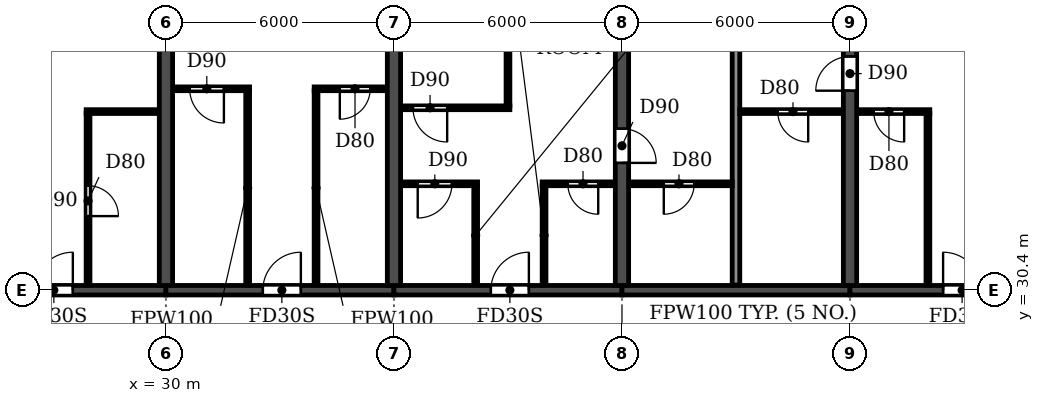
"""IFC4 building model, lengths in metres.
Left out: names, types, materials, properties, quantities, classifications, styles, units other than length and angle.
Written with IfcOpenShell. Run it as: python <this file> out.ifc"""

import sys

from ifc_helpers import new_model, si_unit, direction, frame, frame_2d, origin, place, context, subcontext, project, spatial, rectangle, extrude, element, fill, save


model = new_model("IFC4")
c1 = context("Model", 3, precision=1e-05, world=origin(), true_north=direction((0.0, 1.0)))
c2 = subcontext(c1, "Body", "Model", "MODEL_VIEW")
j1 = project(units=[si_unit("LENGTHUNIT", "METRE"), si_unit("PLANEANGLEUNIT", "RADIAN")], contexts=[c1])
p1 = place(None, origin())
s1 = spatial("IfcSite", under=j1, at=p1, CompositionType="ELEMENT")
p2 = place(p1, origin())
s2 = spatial("IfcBuilding", under=s1, at=p2, CompositionType="ELEMENT")
p3 = place(p2, frame((0.0, 0.0, 112.5)))
s3 = spatial("IfcBuildingStorey", under=s2, at=p3, CompositionType="ELEMENT", Elevation=112.5)
for number, where, z_axis, x_axis in (
    (1, (30.0, 30.525, 0.0), (0.0, 0.0, 1.0), (0.0, 1.0, 0.0)),
    (2, (36.0, 30.525, 0.0), (0.0, 0.0, 1.0), (0.0, 1.0, 0.0)),
):
    element("IfcWall", number, at=place(p3, frame(where, z_axis=z_axis, x_axis=x_axis)), inside=s3, PredefinedType="SHEAR", context=c2, shape_type="SweptSolid", body=[
        extrude(rectangle(XDim=12.875, YDim=0.35, at=frame_2d((6.438, 0.0))), origin(), (0.0, 0.0, 1.0), 2.95),
    ])
p4 = place(p3, frame((42.0, 30.525, 0.0), z_axis=(0.0, 0.0, 1.0), x_axis=(0.0, 1.0, 0.0)))
e3 = element("IfcWall", 3, at=p4, inside=s3, PredefinedType="SHEAR", context=c2, shape_type="SweptSolid", body=[
    extrude(rectangle(XDim=12.875, YDim=0.35, at=frame_2d((6.438, 0.0))), origin(), (0.0, 0.0, 1.0), 2.95),
])
p5 = place(p4, frame((3.225, 0.0, 0.0)))
e4 = element("IfcOpeningElement", 4, at=p5, cuts=e3, PredefinedType="OPENING", context=c2, shape_type="SweptSolid", body=[
    extrude(rectangle(XDim=0.9, YDim=2.1, at=frame_2d((0.45, 1.05))), frame((0.0, 0.185, 0.0), z_axis=(0.0, -1.0, 0.0), x_axis=(1.0, 0.0, 0.0)), (0.0, 0.0, 1.0), 0.37),
])
p6 = place(p3, frame((48.0, 30.525, 0.0), z_axis=(0.0, 0.0, 1.0), x_axis=(0.0, 1.0, 0.0)))
e5 = element("IfcWall", 5, at=p6, inside=s3, PredefinedType="SHEAR", context=c2, shape_type="SweptSolid", body=[
    extrude(rectangle(XDim=12.875, YDim=0.35, at=frame_2d((6.438, 0.0))), origin(), (0.0, 0.0, 1.0), 2.95),
])
p7 = place(p6, frame((5.125, 0.0, 0.0)))
e6 = element("IfcOpeningElement", 6, at=p7, cuts=e5, PredefinedType="OPENING", context=c2, shape_type="SweptSolid", body=[
    extrude(rectangle(XDim=0.9, YDim=2.1, at=frame_2d((0.45, 1.05))), frame((0.0, 0.185, 0.0), z_axis=(0.0, -1.0, 0.0), x_axis=(1.0, 0.0, 0.0)), (0.0, 0.0, 1.0), 0.37),
])
p8 = place(p3, frame((24.0, 30.4, 0.0), z_axis=(0.0, 0.0, 1.0), x_axis=(1.0, 0.0, 0.0)))
e7 = element("IfcWall", 7, at=p8, inside=s3, PredefinedType="SHEAR", context=c2, shape_type="SweptSolid", body=[
    extrude(rectangle(XDim=6.0, YDim=0.25, at=frame_2d((3.0, 0.0))), origin(), (0.0, 0.0, 1.0), 2.35),
])
p9 = place(p8, frame((2.55, 0.0, 0.0)))
e8 = element("IfcOpeningElement", 8, at=p9, cuts=e7, PredefinedType="OPENING", context=c2, shape_type="SweptSolid", body=[
    extrude(rectangle(XDim=1.0, YDim=2.1, at=frame_2d((0.5, 1.05))), frame((0.0, 0.135, 0.0), z_axis=(0.0, -1.0, 0.0), x_axis=(1.0, 0.0, 0.0)), (0.0, 0.0, 1.0), 0.27),
])
p10 = place(p3, frame((30.0, 30.4, 0.0), z_axis=(0.0, 0.0, 1.0), x_axis=(1.0, 0.0, 0.0)))
e9 = element("IfcWall", 9, at=p10, inside=s3, PredefinedType="SHEAR", context=c2, shape_type="SweptSolid", body=[
    extrude(rectangle(XDim=6.0, YDim=0.25, at=frame_2d((3.0, 0.0))), origin(), (0.0, 0.0, 1.0), 2.35),
])
p11 = place(p10, frame((2.55, 0.0, 0.0)))
e10 = element("IfcOpeningElement", 10, at=p11, cuts=e9, PredefinedType="OPENING", context=c2, shape_type="SweptSolid", body=[
    extrude(rectangle(XDim=1.0, YDim=2.1, at=frame_2d((0.5, 1.05))), frame((0.0, 0.135, 0.0), z_axis=(0.0, -1.0, 0.0), x_axis=(1.0, 0.0, 0.0)), (0.0, 0.0, 1.0), 0.27),
])
p12 = place(p3, frame((36.0, 30.4, 0.0), z_axis=(0.0, 0.0, 1.0), x_axis=(1.0, 0.0, 0.0)))
e11 = element("IfcWall", 11, at=p12, inside=s3, PredefinedType="SHEAR", context=c2, shape_type="SweptSolid", body=[
    extrude(rectangle(XDim=6.0, YDim=0.25, at=frame_2d((3.0, 0.0))), origin(), (0.0, 0.0, 1.0), 2.35),
])
p13 = place(p12, frame((2.55, 0.0, 0.0)))
e12 = element("IfcOpeningElement", 12, at=p13, cuts=e11, PredefinedType="OPENING", context=c2, shape_type="SweptSolid", body=[
    extrude(rectangle(XDim=1.0, YDim=2.1, at=frame_2d((0.5, 1.05))), frame((0.0, 0.135, 0.0), z_axis=(0.0, -1.0, 0.0), x_axis=(1.0, 0.0, 0.0)), (0.0, 0.0, 1.0), 0.27),
])
p14 = place(p3, frame((42.0, 30.4, 0.0), z_axis=(0.0, 0.0, 1.0), x_axis=(1.0, 0.0, 0.0)))
e13 = element("IfcWall", 13, at=p14, inside=s3, PredefinedType="SHEAR", context=c2, shape_type="SweptSolid", body=[
    extrude(rectangle(XDim=6.0, YDim=0.25, at=frame_2d((3.0, 0.0))), origin(), (0.0, 0.0, 1.0), 2.35),
])
p15 = place(p3, frame((48.0, 30.4, 0.0), z_axis=(0.0, 0.0, 1.0), x_axis=(1.0, 0.0, 0.0)))
e14 = element("IfcWall", 14, at=p15, inside=s3, PredefinedType="SHEAR", context=c2, shape_type="SweptSolid", body=[
    extrude(rectangle(XDim=6.0, YDim=0.25, at=frame_2d((3.0, 0.0))), origin(), (0.0, 0.0, 1.0), 2.35),
])
p16 = place(p15, frame((2.45, 0.0, 0.0)))
e15 = element("IfcOpeningElement", 15, at=p16, cuts=e14, PredefinedType="OPENING", context=c2, shape_type="SweptSolid", body=[
    extrude(rectangle(XDim=1.0, YDim=2.1, at=frame_2d((0.5, 1.05))), frame((0.0, 0.135, 0.0), z_axis=(0.0, -1.0, 0.0), x_axis=(1.0, 0.0, 0.0)), (0.0, 0.0, 1.0), 0.27),
])
p17 = place(p3, frame((45.0, 30.535, 0.0), z_axis=(0.0, 0.0, 1.0), x_axis=(0.0, 1.0, 0.0)))
e16 = element("IfcWall", 16, at=p17, inside=s3, PredefinedType="PARTITIONING", context=c2, shape_type="SweptSolid", body=[
    extrude(rectangle(XDim=13.005, YDim=0.2, at=frame_2d((6.502, 0.0))), origin(), (0.0, 0.0, 1.0), 2.95),
])
p18 = place(p3, frame((36.185, 33.2, 0.0), z_axis=(0.0, 0.0, 1.0), x_axis=(1.0, 0.0, 0.0)))
e17 = element("IfcWall", 17, at=p18, inside=s3, PredefinedType="PARTITIONING", context=c2, shape_type="SweptSolid", body=[
    extrude(rectangle(XDim=2.015, YDim=0.1, at=frame_2d((1.007, 0.0))), origin(), (0.0, 0.0, 1.0), 2.95),
])
p19 = place(p18, frame((0.44, 0.0, 0.0)))
e18 = element("IfcOpeningElement", 18, at=p19, cuts=e17, PredefinedType="OPENING", context=c2, shape_type="SweptSolid", body=[
    extrude(rectangle(XDim=0.9, YDim=2.1, at=frame_2d((0.45, 1.05))), frame((0.0, 0.06, 0.0), z_axis=(0.0, -1.0, 0.0), x_axis=(1.0, 0.0, 0.0)), (0.0, 0.0, 1.0), 0.12),
])
p20 = place(p3, frame((39.9, 33.2, 0.0), z_axis=(0.0, 0.0, 1.0), x_axis=(1.0, 0.0, 0.0)))
e19 = element("IfcWall", 19, at=p20, inside=s3, PredefinedType="PARTITIONING", context=c2, shape_type="SweptSolid", body=[
    extrude(rectangle(XDim=1.915, YDim=0.1, at=frame_2d((0.958, 0.0))), origin(), (0.0, 0.0, 1.0), 2.95),
])
p21 = place(p20, frame((0.675, 0.0, 0.0)))
e20 = element("IfcOpeningElement", 20, at=p21, cuts=e19, PredefinedType="OPENING", context=c2, shape_type="SweptSolid", body=[
    extrude(rectangle(XDim=0.8, YDim=2.1, at=frame_2d((0.4, 1.05))), frame((0.0, 0.06, 0.0), z_axis=(0.0, -1.0, 0.0), x_axis=(1.0, 0.0, 0.0)), (0.0, 0.0, 1.0), 0.12),
])
p22 = place(p3, frame((42.185, 33.2, 0.0), z_axis=(0.0, 0.0, 1.0), x_axis=(1.0, 0.0, 0.0)))
e21 = element("IfcWall", 21, at=p22, inside=s3, PredefinedType="PARTITIONING", context=c2, shape_type="SweptSolid", body=[
    extrude(rectangle(XDim=2.715, YDim=0.1, at=frame_2d((1.357, 0.0))), origin(), (0.0, 0.0, 1.0), 2.95),
])
p23 = place(p22, frame((0.915, 0.0, 0.0)))
e22 = element("IfcOpeningElement", 22, at=p23, cuts=e21, PredefinedType="OPENING", context=c2, shape_type="SweptSolid", body=[
    extrude(rectangle(XDim=0.8, YDim=2.1, at=frame_2d((0.4, 1.05))), frame((0.0, 0.06, 0.0), z_axis=(0.0, -1.0, 0.0), x_axis=(1.0, 0.0, 0.0)), (0.0, 0.0, 1.0), 0.12),
])
p24 = place(p3, frame((27.9, 35.1, 0.0), z_axis=(0.0, 0.0, 1.0), x_axis=(1.0, 0.0, 0.0)))
e23 = element("IfcWall", 23, at=p24, inside=s3, PredefinedType="PARTITIONING", context=c2, shape_type="SweptSolid", body=[
    extrude(rectangle(XDim=1.915, YDim=0.1, at=frame_2d((0.958, 0.0))), origin(), (0.0, 0.0, 1.0), 2.95),
])
p25 = place(p3, frame((45.1, 35.1, 0.0), z_axis=(0.0, 0.0, 1.0), x_axis=(1.0, 0.0, 0.0)))
e24 = element("IfcWall", 24, at=p25, inside=s3, PredefinedType="PARTITIONING", context=c2, shape_type="SweptSolid", body=[
    extrude(rectangle(XDim=2.715, YDim=0.1, at=frame_2d((1.357, 0.0))), origin(), (0.0, 0.0, 1.0), 2.95),
])
p26 = place(p25, frame((1.0, 0.0, 0.0)))
e25 = element("IfcOpeningElement", 25, at=p26, cuts=e24, PredefinedType="OPENING", context=c2, shape_type="SweptSolid", body=[
    extrude(rectangle(XDim=0.8, YDim=2.1, at=frame_2d((0.4, 1.05))), frame((0.0, 0.06, 0.0), z_axis=(0.0, -1.0, 0.0), x_axis=(1.0, 0.0, 0.0)), (0.0, 0.0, 1.0), 0.12),
])
p27 = place(p3, frame((48.185, 35.1, 0.0), z_axis=(0.0, 0.0, 1.0), x_axis=(1.0, 0.0, 0.0)))
e26 = element("IfcWall", 26, at=p27, inside=s3, PredefinedType="PARTITIONING", context=c2, shape_type="SweptSolid", body=[
    extrude(rectangle(XDim=1.915, YDim=0.1, at=frame_2d((0.958, 0.0))), origin(), (0.0, 0.0, 1.0), 2.95),
])
p28 = place(p27, frame((0.44, 0.0, 0.0)))
e27 = element("IfcOpeningElement", 27, at=p28, cuts=e26, PredefinedType="OPENING", context=c2, shape_type="SweptSolid", body=[
    extrude(rectangle(XDim=0.8, YDim=2.1, at=frame_2d((0.4, 1.05))), frame((0.0, 0.06, 0.0), z_axis=(0.0, -1.0, 0.0), x_axis=(1.0, 0.0, 0.0)), (0.0, 0.0, 1.0), 0.12),
])
p29 = place(p3, frame((36.185, 35.2, 0.0), z_axis=(0.0, 0.0, 1.0), x_axis=(1.0, 0.0, 0.0)))
e28 = element("IfcWall", 28, at=p29, inside=s3, PredefinedType="PARTITIONING", context=c2, shape_type="SweptSolid", body=[
    extrude(rectangle(XDim=2.865, YDim=0.1, at=frame_2d((1.433, 0.0))), origin(), (0.0, 0.0, 1.0), 2.95),
])
p30 = place(p29, frame((0.315, 0.0, 0.0)))
e29 = element("IfcOpeningElement", 29, at=p30, cuts=e28, PredefinedType="OPENING", context=c2, shape_type="SweptSolid", body=[
    extrude(rectangle(XDim=0.9, YDim=2.1, at=frame_2d((0.45, 1.05))), frame((0.0, 0.06, 0.0), z_axis=(0.0, -1.0, 0.0), x_axis=(1.0, 0.0, 0.0)), (0.0, 0.0, 1.0), 0.12),
])
p31 = place(p3, frame((30.185, 35.7, 0.0), z_axis=(0.0, 0.0, 1.0), x_axis=(1.0, 0.0, 0.0)))
e30 = element("IfcWall", 30, at=p31, inside=s3, PredefinedType="PARTITIONING", context=c2, shape_type="SweptSolid", body=[
    extrude(rectangle(XDim=2.015, YDim=0.1, at=frame_2d((1.007, 0.0))), origin(), (0.0, 0.0, 1.0), 2.95),
])
p32 = place(p31, frame((0.44, 0.0, 0.0)))
e31 = element("IfcOpeningElement", 31, at=p32, cuts=e30, PredefinedType="OPENING", context=c2, shape_type="SweptSolid", body=[
    extrude(rectangle(XDim=0.9, YDim=2.1, at=frame_2d((0.45, 1.05))), frame((0.0, 0.06, 0.0), z_axis=(0.0, -1.0, 0.0), x_axis=(1.0, 0.0, 0.0)), (0.0, 0.0, 1.0), 0.12),
])
p33 = place(p3, frame((33.9, 35.7, 0.0), z_axis=(0.0, 0.0, 1.0), x_axis=(1.0, 0.0, 0.0)))
e32 = element("IfcWall", 32, at=p33, inside=s3, PredefinedType="PARTITIONING", context=c2, shape_type="SweptSolid", body=[
    extrude(rectangle(XDim=1.915, YDim=0.1, at=frame_2d((0.958, 0.0))), origin(), (0.0, 0.0, 1.0), 2.95),
])
p34 = place(p33, frame((0.675, 0.0, 0.0)))
e33 = element("IfcOpeningElement", 33, at=p34, cuts=e32, PredefinedType="OPENING", context=c2, shape_type="SweptSolid", body=[
    extrude(rectangle(XDim=0.8, YDim=2.1, at=frame_2d((0.4, 1.05))), frame((0.0, 0.06, 0.0), z_axis=(0.0, -1.0, 0.0), x_axis=(1.0, 0.0, 0.0)), (0.0, 0.0, 1.0), 0.12),
])
p35 = place(p3, frame((27.95, 30.535, 0.0), z_axis=(0.0, 0.0, 1.0), x_axis=(0.0, 1.0, 0.0)))
e34 = element("IfcWall", 34, at=p35, inside=s3, PredefinedType="PARTITIONING", context=c2, shape_type="SweptSolid", body=[
    extrude(rectangle(XDim=4.515, YDim=0.1, at=frame_2d((2.258, 0.0))), origin(), (0.0, 0.0, 1.0), 2.95),
])
p36 = place(p35, frame((1.815, 0.0, 0.0)))
e35 = element("IfcOpeningElement", 35, at=p36, cuts=e34, PredefinedType="OPENING", context=c2, shape_type="SweptSolid", body=[
    extrude(rectangle(XDim=0.8, YDim=2.1, at=frame_2d((0.4, 1.05))), frame((0.0, 0.06, 0.0), z_axis=(0.0, -1.0, 0.0), x_axis=(1.0, 0.0, 0.0)), (0.0, 0.0, 1.0), 0.12),
])
for number, where, z_axis, x_axis in (
    (36, (32.15, 30.535, 0.0), (0.0, 0.0, 1.0), (0.0, 1.0, 0.0)),
    (37, (33.95, 30.535, 0.0), (0.0, 0.0, 1.0), (0.0, 1.0, 0.0)),
):
    element("IfcWall", number, at=place(p3, frame(where, z_axis=z_axis, x_axis=x_axis)), inside=s3, PredefinedType="PARTITIONING", context=c2, shape_type="SweptSolid", body=[
        extrude(rectangle(XDim=5.115, YDim=0.1, at=frame_2d((2.558, 0.0))), origin(), (0.0, 0.0, 1.0), 2.95),
    ])
p37 = place(p3, frame((38.15, 30.535, 0.0), z_axis=(0.0, 0.0, 1.0), x_axis=(0.0, 1.0, 0.0)))
e38 = element("IfcWall", 38, at=p37, inside=s3, PredefinedType="PARTITIONING", context=c2, shape_type="SweptSolid", body=[
    extrude(rectangle(XDim=2.615, YDim=0.1, at=frame_2d((1.308, 0.0))), origin(), (0.0, 0.0, 1.0), 2.95),
])
p38 = place(p3, frame((39.0, 35.25, 0.0), z_axis=(0.0, 0.0, 1.0), x_axis=(0.0, 1.0, 0.0)))
e39 = element("IfcWall", 39, at=p38, inside=s3, PredefinedType="PARTITIONING", context=c2, shape_type="SweptSolid", body=[
    extrude(rectangle(XDim=8.29, YDim=0.1, at=frame_2d((4.145, 0.0))), origin(), (0.0, 0.0, 1.0), 2.95),
])
p39 = place(p3, frame((39.95, 30.535, 0.0), z_axis=(0.0, 0.0, 1.0), x_axis=(0.0, 1.0, 0.0)))
e40 = element("IfcWall", 40, at=p39, inside=s3, PredefinedType="PARTITIONING", context=c2, shape_type="SweptSolid", body=[
    extrude(rectangle(XDim=2.615, YDim=0.1, at=frame_2d((1.308, 0.0))), origin(), (0.0, 0.0, 1.0), 2.95),
])
p40 = place(p3, frame((50.05, 30.535, 0.0), z_axis=(0.0, 0.0, 1.0), x_axis=(0.0, 1.0, 0.0)))
e41 = element("IfcWall", 41, at=p40, inside=s3, PredefinedType="PARTITIONING", context=c2, shape_type="SweptSolid", body=[
    extrude(rectangle(XDim=4.515, YDim=0.1, at=frame_2d((2.258, 0.0))), origin(), (0.0, 0.0, 1.0), 2.95),
])
p41 = place(p9, origin())
e42 = element("IfcDoor", 42, at=p41, inside=s3, OperationType="SINGLE_SWING_RIGHT", PredefinedType="DOOR", context=c2, shape_type="SweptSolid", body=[
    extrude(rectangle(XDim=1.0, YDim=2.1, at=frame_2d((0.5, 1.05))), frame((0.0, 0.025, 0.0), z_axis=(0.0, -1.0, 0.0), x_axis=(1.0, 0.0, 0.0)), (0.0, 0.0, 1.0), 0.05),
])
fill(e8, e42)
p42 = place(p36, frame((0.8, 0.0, 0.0), z_axis=(0.0, 0.0, 1.0), x_axis=(-1.0, 0.0, 0.0)))
e43 = element("IfcDoor", 43, at=p42, inside=s3, OperationType="SINGLE_SWING_RIGHT", PredefinedType="DOOR", context=c2, shape_type="SweptSolid", body=[
    extrude(rectangle(XDim=0.8, YDim=2.1, at=frame_2d((0.4, 1.05))), frame((0.0, 0.025, 0.0), z_axis=(0.0, -1.0, 0.0), x_axis=(1.0, 0.0, 0.0)), (0.0, 0.0, 1.0), 0.05),
])
fill(e35, e43)
p43 = place(p32, frame((0.9, 0.0, 0.0), z_axis=(0.0, 0.0, 1.0), x_axis=(-1.0, 0.0, 0.0)))
e44 = element("IfcDoor", 44, at=p43, inside=s3, OperationType="SINGLE_SWING_LEFT", PredefinedType="DOOR", context=c2, shape_type="SweptSolid", body=[
    extrude(rectangle(XDim=0.9, YDim=2.1, at=frame_2d((0.45, 1.05))), frame((0.0, 0.025, 0.0), z_axis=(0.0, -1.0, 0.0), x_axis=(1.0, 0.0, 0.0)), (0.0, 0.0, 1.0), 0.05),
])
fill(e31, e44)
p44 = place(p11, origin())
e45 = element("IfcDoor", 45, at=p44, inside=s3, OperationType="SINGLE_SWING_RIGHT", PredefinedType="DOOR", context=c2, shape_type="SweptSolid", body=[
    extrude(rectangle(XDim=1.0, YDim=2.1, at=frame_2d((0.5, 1.05))), frame((0.0, 0.025, 0.0), z_axis=(0.0, -1.0, 0.0), x_axis=(1.0, 0.0, 0.0)), (0.0, 0.0, 1.0), 0.05),
])
fill(e10, e45)
p45 = place(p34, frame((0.8, 0.0, 0.0), z_axis=(0.0, 0.0, 1.0), x_axis=(-1.0, 0.0, 0.0)))
e46 = element("IfcDoor", 46, at=p45, inside=s3, OperationType="SINGLE_SWING_RIGHT", PredefinedType="DOOR", context=c2, shape_type="SweptSolid", body=[
    extrude(rectangle(XDim=0.8, YDim=2.1, at=frame_2d((0.4, 1.05))), frame((0.0, 0.025, 0.0), z_axis=(0.0, -1.0, 0.0), x_axis=(1.0, 0.0, 0.0)), (0.0, 0.0, 1.0), 0.05),
])
fill(e33, e46)
p46 = place(p23, frame((0.8, 0.0, 0.0), z_axis=(0.0, 0.0, 1.0), x_axis=(-1.0, 0.0, 0.0)))
e47 = element("IfcDoor", 47, at=p46, inside=s3, OperationType="SINGLE_SWING_RIGHT", PredefinedType="DOOR", context=c2, shape_type="SweptSolid", body=[
    extrude(rectangle(XDim=0.8, YDim=2.1, at=frame_2d((0.4, 1.05))), frame((0.0, 0.025, 0.0), z_axis=(0.0, -1.0, 0.0), x_axis=(1.0, 0.0, 0.0)), (0.0, 0.0, 1.0), 0.05),
])
fill(e22, e47)
p47 = place(p30, frame((0.9, 0.0, 0.0), z_axis=(0.0, 0.0, 1.0), x_axis=(-1.0, 0.0, 0.0)))
e48 = element("IfcDoor", 48, at=p47, inside=s3, OperationType="SINGLE_SWING_LEFT", PredefinedType="DOOR", context=c2, shape_type="SweptSolid", body=[
    extrude(rectangle(XDim=0.9, YDim=2.1, at=frame_2d((0.45, 1.05))), frame((0.0, 0.025, 0.0), z_axis=(0.0, -1.0, 0.0), x_axis=(1.0, 0.0, 0.0)), (0.0, 0.0, 1.0), 0.05),
])
fill(e29, e48)
p48 = place(p19, frame((0.9, 0.0, 0.0), z_axis=(0.0, 0.0, 1.0), x_axis=(-1.0, 0.0, 0.0)))
e49 = element("IfcDoor", 49, at=p48, inside=s3, OperationType="SINGLE_SWING_RIGHT", PredefinedType="DOOR", context=c2, shape_type="SweptSolid", body=[
    extrude(rectangle(XDim=0.9, YDim=2.1, at=frame_2d((0.45, 1.05))), frame((0.0, 0.025, 0.0), z_axis=(0.0, -1.0, 0.0), x_axis=(1.0, 0.0, 0.0)), (0.0, 0.0, 1.0), 0.05),
])
fill(e18, e49)
p49 = place(p13, origin())
e50 = element("IfcDoor", 50, at=p49, inside=s3, OperationType="SINGLE_SWING_RIGHT", PredefinedType="DOOR", context=c2, shape_type="SweptSolid", body=[
    extrude(rectangle(XDim=1.0, YDim=2.1, at=frame_2d((0.5, 1.05))), frame((0.0, 0.025, 0.0), z_axis=(0.0, -1.0, 0.0), x_axis=(1.0, 0.0, 0.0)), (0.0, 0.0, 1.0), 0.05),
])
fill(e12, e50)
p50 = place(p21, frame((0.8, 0.0, 0.0), z_axis=(0.0, 0.0, 1.0), x_axis=(-1.0, 0.0, 0.0)))
e51 = element("IfcDoor", 51, at=p50, inside=s3, OperationType="SINGLE_SWING_LEFT", PredefinedType="DOOR", context=c2, shape_type="SweptSolid", body=[
    extrude(rectangle(XDim=0.8, YDim=2.1, at=frame_2d((0.4, 1.05))), frame((0.0, 0.025, 0.0), z_axis=(0.0, -1.0, 0.0), x_axis=(1.0, 0.0, 0.0)), (0.0, 0.0, 1.0), 0.05),
])
fill(e20, e51)
p51 = place(p5, frame((0.9, 0.0, 0.0), z_axis=(0.0, 0.0, 1.0), x_axis=(-1.0, 0.0, 0.0)))
e52 = element("IfcDoor", 52, at=p51, inside=s3, OperationType="SINGLE_SWING_RIGHT", PredefinedType="DOOR", context=c2, shape_type="SweptSolid", body=[
    extrude(rectangle(XDim=0.9, YDim=2.1, at=frame_2d((0.45, 1.05))), frame((0.0, 0.025, 0.0), z_axis=(0.0, -1.0, 0.0), x_axis=(1.0, 0.0, 0.0)), (0.0, 0.0, 1.0), 0.05),
])
fill(e4, e52)
p52 = place(p26, frame((0.8, 0.0, 0.0), z_axis=(0.0, 0.0, 1.0), x_axis=(-1.0, 0.0, 0.0)))
e53 = element("IfcDoor", 53, at=p52, inside=s3, OperationType="SINGLE_SWING_LEFT", PredefinedType="DOOR", context=c2, shape_type="SweptSolid", body=[
    extrude(rectangle(XDim=0.8, YDim=2.1, at=frame_2d((0.4, 1.05))), frame((0.0, 0.025, 0.0), z_axis=(0.0, -1.0, 0.0), x_axis=(1.0, 0.0, 0.0)), (0.0, 0.0, 1.0), 0.05),
])
fill(e25, e53)
p53 = place(p7, origin())
e54 = element("IfcDoor", 54, at=p53, inside=s3, OperationType="SINGLE_SWING_LEFT", PredefinedType="DOOR", context=c2, shape_type="SweptSolid", body=[
    extrude(rectangle(XDim=0.9, YDim=2.1, at=frame_2d((0.45, 1.05))), frame((0.0, 0.025, 0.0), z_axis=(0.0, -1.0, 0.0), x_axis=(1.0, 0.0, 0.0)), (0.0, 0.0, 1.0), 0.05),
])
fill(e6, e54)
p54 = place(p28, frame((0.8, 0.0, 0.0), z_axis=(0.0, 0.0, 1.0), x_axis=(-1.0, 0.0, 0.0)))
e55 = element("IfcDoor", 55, at=p54, inside=s3, OperationType="SINGLE_SWING_LEFT", PredefinedType="DOOR", context=c2, shape_type="SweptSolid", body=[
    extrude(rectangle(XDim=0.8, YDim=2.1, at=frame_2d((0.4, 1.05))), frame((0.0, 0.025, 0.0), z_axis=(0.0, -1.0, 0.0), x_axis=(1.0, 0.0, 0.0)), (0.0, 0.0, 1.0), 0.05),
])
fill(e27, e55)
p55 = place(p16, origin())
e56 = element("IfcDoor", 56, at=p55, inside=s3, OperationType="SINGLE_SWING_LEFT", PredefinedType="DOOR", context=c2, shape_type="SweptSolid", body=[
    extrude(rectangle(XDim=1.0, YDim=2.1, at=frame_2d((0.5, 1.05))), frame((0.0, 0.025, 0.0), z_axis=(0.0, -1.0, 0.0), x_axis=(1.0, 0.0, 0.0)), (0.0, 0.0, 1.0), 0.05),
])
fill(e15, e56)
save(model, sys.argv[1])
